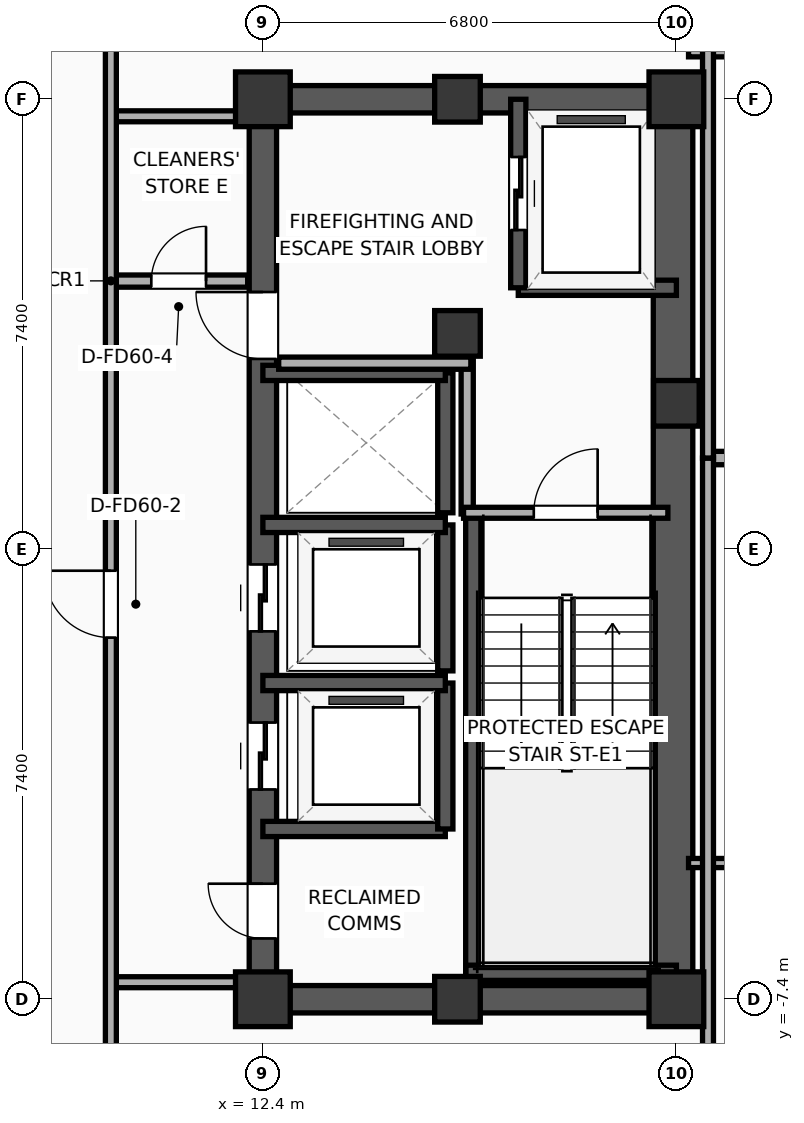
"""IFC4 building model, lengths in metres.
Left out: names, types, materials, properties, quantities, classifications, styles, units other than length and angle.
Written with IfcOpenShell. Run it as: python <this file> out.ifc"""

import sys

from ifc_helpers import new_model, si_unit, direction, frame, frame_2d, origin, origin_2d, place, context, subcontext, project, spatial, rectangle, extrude, element, fill, save


model = new_model("IFC4")
c1 = context("Model", 3, precision=1e-05, world=origin(), true_north=direction((0.0, 1.0)))
c2 = subcontext(c1, "Body", "Model", "MODEL_VIEW")
j1 = project(units=[si_unit("LENGTHUNIT", "METRE"), si_unit("PLANEANGLEUNIT", "RADIAN")], contexts=[c1])
p1 = place(None, origin())
s1 = spatial("IfcSite", under=j1, at=p1, CompositionType="ELEMENT")
p2 = place(p1, origin())
s2 = spatial("IfcBuilding", under=s1, at=p2, CompositionType="ELEMENT")
p3 = place(p2, frame((0.0, 0.0, 159.9)))
s3 = spatial("IfcBuildingStorey", under=s2, at=p3, CompositionType="ELEMENT", Elevation=159.9)
p4 = place(p3, frame((12.4, -7.4, 0.0), z_axis=(0.0, 0.0, 1.0), x_axis=(1.0, 0.0, 0.0)))
e1 = element("IfcColumn", 1, at=p4, inside=s3, PredefinedType="COLUMN", context=c2, shape_type="SweptSolid", body=[
    extrude(rectangle(XDim=0.9, YDim=0.9, at=origin_2d()), origin(), (0.0, 0.0, 1.0), 3.9),
])
p5 = place(p3, frame((15.6, 3.55, 0.0), z_axis=(0.0, 0.0, 1.0), x_axis=(1.0, 0.0, 0.0)))
e2 = element("IfcColumn", 2, at=p5, inside=s3, PredefinedType="COLUMN", context=c2, shape_type="SweptSolid", body=[
    extrude(rectangle(XDim=0.75, YDim=0.75, at=origin_2d()), origin(), (0.0, 0.0, 1.0), 3.9),
])
p6 = place(p3, frame((12.4, 7.4, 0.0), z_axis=(0.0, 0.0, 1.0), x_axis=(1.0, 0.0, 0.0)))
e3 = element("IfcColumn", 3, at=p6, inside=s3, PredefinedType="COLUMN", context=c2, shape_type="SweptSolid", body=[
    extrude(rectangle(XDim=0.9, YDim=0.9, at=origin_2d()), origin(), (0.0, 0.0, 1.0), 3.9),
])
for number, where, z_axis, x_axis in (
    (4, (15.6, -7.4, 0.0), (0.0, 0.0, 1.0), (1.0, 0.0, 0.0)),
    (5, (15.6, 7.4, 0.0), (0.0, 0.0, 1.0), (1.0, 0.0, 0.0)),
):
    element("IfcColumn", number, at=place(p3, frame(where, z_axis=z_axis, x_axis=x_axis)), inside=s3, PredefinedType="COLUMN", context=c2, shape_type="SweptSolid", body=[
        extrude(rectangle(XDim=0.75, YDim=0.75, at=origin_2d()), origin(), (0.0, 0.0, 1.0), 3.9),
    ])
p7 = place(p3, frame((19.2, -7.4, 0.0), z_axis=(0.0, 0.0, 1.0), x_axis=(1.0, 0.0, 0.0)))
e6 = element("IfcColumn", 6, at=p7, inside=s3, PredefinedType="COLUMN", context=c2, shape_type="SweptSolid", body=[
    extrude(rectangle(XDim=0.9, YDim=0.9, at=origin_2d()), origin(), (0.0, 0.0, 1.0), 3.9),
])
p8 = place(p3, frame((19.2, 2.4, 0.0), z_axis=(0.0, 0.0, 1.0), x_axis=(1.0, 0.0, 0.0)))
e7 = element("IfcColumn", 7, at=p8, inside=s3, PredefinedType="COLUMN", context=c2, shape_type="SweptSolid", body=[
    extrude(rectangle(XDim=0.75, YDim=0.75, at=origin_2d()), origin(), (0.0, 0.0, 1.0), 3.9),
])
p9 = place(p3, frame((19.2, 7.4, 0.0), z_axis=(0.0, 0.0, 1.0), x_axis=(1.0, 0.0, 0.0)))
e8 = element("IfcColumn", 8, at=p9, inside=s3, PredefinedType="COLUMN", context=c2, shape_type="SweptSolid", body=[
    extrude(rectangle(XDim=0.9, YDim=0.9, at=origin_2d()), origin(), (0.0, 0.0, 1.0), 3.9),
])
for number, where, z_axis, x_axis in (
    (9, (12.175, -7.4, 0.0), (0.0, 0.0, 1.0), (1.0, 0.0, 0.0)),
    (10, (12.175, 7.4, 0.0), (0.0, 0.0, 1.0), (1.0, 0.0, 0.0)),
):
    element("IfcWall", number, at=place(p3, frame(where, z_axis=z_axis, x_axis=x_axis)), inside=s3, PredefinedType="SHEAR", context=c2, shape_type="SweptSolid", body=[
        extrude(rectangle(XDim=7.25, YDim=0.45, at=frame_2d((3.625, 0.0))), origin(), (0.0, 0.0, 1.0), 3.65),
    ])
p10 = place(p3, frame((12.4, -7.4, 0.0), z_axis=(0.0, 0.0, 1.0), x_axis=(0.0, 1.0, 0.0)))
e11 = element("IfcWall", 11, at=p10, inside=s3, PredefinedType="SHEAR", context=c2, shape_type="SweptSolid", body=[
    extrude(rectangle(XDim=14.8, YDim=0.45, at=frame_2d((7.4, 0.0))), origin(), (0.0, 0.0, 1.0), 3.65),
])
p11 = place(p10, frame((3.45, 0.0, 0.0)))
e12 = element("IfcOpeningElement", 12, at=p11, cuts=e11, PredefinedType="OPENING", context=c2, shape_type="SweptSolid", body=[
    extrude(rectangle(XDim=1.1, YDim=2.05, at=frame_2d((0.55, 1.025))), frame((0.0, 0.235, 0.0), z_axis=(0.0, -1.0, 0.0), x_axis=(1.0, 0.0, 0.0)), (0.0, 0.0, 1.0), 0.47),
])
p12 = place(p10, frame((6.05, 0.0, 0.0)))
e13 = element("IfcOpeningElement", 13, at=p12, cuts=e11, PredefinedType="OPENING", context=c2, shape_type="SweptSolid", body=[
    extrude(rectangle(XDim=1.1, YDim=2.05, at=frame_2d((0.55, 1.025))), frame((0.0, 0.235, 0.0), z_axis=(0.0, -1.0, 0.0), x_axis=(1.0, 0.0, 0.0)), (0.0, 0.0, 1.0), 0.47),
])
p13 = place(p10, frame((10.53, 0.0, 0.0)))
e14 = element("IfcOpeningElement", 14, at=p13, cuts=e11, PredefinedType="OPENING", context=c2, shape_type="SweptSolid", body=[
    extrude(rectangle(XDim=1.1, YDim=2.05, at=frame_2d((0.55, 1.025))), frame((0.0, 0.235, 0.0), z_axis=(0.0, -1.0, 0.0), x_axis=(1.0, 0.0, 0.0)), (0.0, 0.0, 1.0), 0.47),
])
p14 = place(p10, frame((1.0, 0.0, 0.0)))
e15 = element("IfcOpeningElement", 15, at=p14, cuts=e11, PredefinedType="OPENING", context=c2, shape_type="SweptSolid", body=[
    extrude(rectangle(XDim=0.9, YDim=2.05, at=frame_2d((0.45, 1.025))), frame((0.0, 0.235, 0.0), z_axis=(0.0, -1.0, 0.0), x_axis=(1.0, 0.0, 0.0)), (0.0, 0.0, 1.0), 0.47),
])
p15 = place(p3, frame((19.145, -7.4, 0.0), z_axis=(0.0, 0.0, 1.0), x_axis=(0.0, 1.0, 0.0)))
e16 = element("IfcWall", 16, at=p15, inside=s3, PredefinedType="SHEAR", context=c2, shape_type="SweptSolid", body=[
    extrude(rectangle(XDim=14.8, YDim=0.65, at=frame_2d((7.4, 0.0))), origin(), (0.0, 0.0, 1.0), 3.65),
])
p16 = place(p3, frame((15.86, -7.085, 0.0), z_axis=(0.0, 0.0, 1.0), x_axis=(0.0, 1.0, 0.0)))
e17 = element("IfcWall", 17, at=p16, inside=s3, PredefinedType="SOLIDWALL", context=c2, shape_type="SweptSolid", body=[
    extrude(rectangle(XDim=7.685, YDim=0.25, at=frame_2d((3.843, 0.0))), origin(), (0.0, 0.0, 1.0), 3.65),
])
p17 = place(p3, frame((15.74, -6.965, 0.0), z_axis=(0.0, 0.0, 1.0), x_axis=(1.0, 0.0, 0.0)))
e18 = element("IfcWall", 18, at=p17, inside=s3, PredefinedType="SOLIDWALL", context=c2, shape_type="SweptSolid", body=[
    extrude(rectangle(XDim=3.46, YDim=0.25, at=frame_2d((1.73, 0.0))), origin(), (0.0, 0.0, 1.0), 3.65),
])
p18 = place(p3, frame((16.6, 4.3, 0.0), z_axis=(0.0, 0.0, 1.0), x_axis=(1.0, 0.0, 0.0)))
e19 = element("IfcWall", 19, at=p18, inside=s3, PredefinedType="SOLIDWALL", context=c2, shape_type="SweptSolid", body=[
    extrude(rectangle(XDim=2.6, YDim=0.25, at=frame_2d((1.3, 0.0))), origin(), (0.0, 0.0, 1.0), 3.65),
])
p19 = place(p3, frame((16.6, 7.4, 0.0), z_axis=(0.0, 0.0, 1.0), x_axis=(0.0, -1.0, 0.0)))
e20 = element("IfcWall", 20, at=p19, inside=s3, PredefinedType="SOLIDWALL", context=c2, shape_type="SweptSolid", body=[
    extrude(rectangle(XDim=3.1, YDim=0.25, at=frame_2d((1.55, 0.0))), origin(), (0.0, 0.0, 1.0), 3.65),
])
p20 = place(p19, frame((0.95, 0.0, 0.0)))
e21 = element("IfcOpeningElement", 21, at=p20, cuts=e20, PredefinedType="OPENING", context=c2, shape_type="SweptSolid", body=[
    extrude(rectangle(XDim=1.2, YDim=2.05, at=frame_2d((0.6, 1.025))), frame((0.0, 0.135, 0.0), z_axis=(0.0, -1.0, 0.0), x_axis=(1.0, 0.0, 0.0)), (0.0, 0.0, 1.0), 0.27),
])
p21 = place(p3, frame((12.4, -4.6, 0.0), z_axis=(0.0, 0.0, 1.0), x_axis=(1.0, 0.0, 0.0)))
e22 = element("IfcWall", 22, at=p21, inside=s3, PredefinedType="SOLIDWALL", context=c2, shape_type="SweptSolid", body=[
    extrude(rectangle(XDim=3.0, YDim=0.25, at=frame_2d((1.5, 0.0))), origin(), (0.0, 0.0, 1.0), 3.65),
])
p22 = place(p3, frame((15.4, -4.6, 0.0), z_axis=(0.0, 0.0, 1.0), x_axis=(0.0, 1.0, 0.0)))
e23 = element("IfcWall", 23, at=p22, inside=s3, PredefinedType="SOLIDWALL", context=c2, shape_type="SweptSolid", body=[
    extrude(rectangle(XDim=2.4, YDim=0.25, at=frame_2d((1.2, 0.0))), origin(), (0.0, 0.0, 1.0), 3.65),
])
p23 = place(p3, frame((15.4, -2.2, 0.0), z_axis=(0.0, 0.0, 1.0), x_axis=(-1.0, 0.0, 0.0)))
e24 = element("IfcWall", 24, at=p23, inside=s3, PredefinedType="SOLIDWALL", context=c2, shape_type="SweptSolid", body=[
    extrude(rectangle(XDim=3.0, YDim=0.25, at=frame_2d((1.5, 0.0))), origin(), (0.0, 0.0, 1.0), 3.65),
])
p24 = place(p3, frame((15.4, -2.0, 0.0), z_axis=(0.0, 0.0, 1.0), x_axis=(0.0, 1.0, 0.0)))
e25 = element("IfcWall", 25, at=p24, inside=s3, PredefinedType="SOLIDWALL", context=c2, shape_type="SweptSolid", body=[
    extrude(rectangle(XDim=2.4, YDim=0.25, at=frame_2d((1.2, 0.0))), origin(), (0.0, 0.0, 1.0), 3.65),
])
p25 = place(p3, frame((15.4, 0.4, 0.0), z_axis=(0.0, 0.0, 1.0), x_axis=(-1.0, 0.0, 0.0)))
e26 = element("IfcWall", 26, at=p25, inside=s3, PredefinedType="SOLIDWALL", context=c2, shape_type="SweptSolid", body=[
    extrude(rectangle(XDim=3.0, YDim=0.25, at=frame_2d((1.5, 0.0))), origin(), (0.0, 0.0, 1.0), 3.65),
])
p26 = place(p3, frame((15.4, 0.6, 0.0), z_axis=(0.0, 0.0, 1.0), x_axis=(0.0, 1.0, 0.0)))
e27 = element("IfcWall", 27, at=p26, inside=s3, PredefinedType="SOLIDWALL", context=c2, shape_type="SweptSolid", body=[
    extrude(rectangle(XDim=2.3, YDim=0.25, at=frame_2d((1.15, 0.0))), origin(), (0.0, 0.0, 1.0), 3.65),
])
p27 = place(p3, frame((15.4, 2.9, 0.0), z_axis=(0.0, 0.0, 1.0), x_axis=(-1.0, 0.0, 0.0)))
e28 = element("IfcWall", 28, at=p27, inside=s3, PredefinedType="SOLIDWALL", context=c2, shape_type="SweptSolid", body=[
    extrude(rectangle(XDim=3.0, YDim=0.25, at=frame_2d((1.5, 0.0))), origin(), (0.0, 0.0, 1.0), 3.65),
])
p28 = place(p3, frame((15.76, 0.58, 0.0), z_axis=(0.0, 0.0, 1.0), x_axis=(0.0, 1.0, 0.0)))
e29 = element("IfcWall", 29, at=p28, inside=s3, PredefinedType="PARTITIONING", context=c2, shape_type="SweptSolid", body=[
    extrude(rectangle(XDim=2.52, YDim=0.2, at=frame_2d((1.26, 0.0))), origin(), (0.0, 0.0, 1.0), 3.65),
])
p29 = place(p3, frame((12.66, 3.06, 0.0), z_axis=(0.0, 0.0, 1.0), x_axis=(1.0, 0.0, 0.0)))
e30 = element("IfcWall", 30, at=p29, inside=s3, PredefinedType="PARTITIONING", context=c2, shape_type="SweptSolid", body=[
    extrude(rectangle(XDim=3.16, YDim=0.2, at=frame_2d((1.58, 0.0))), origin(), (0.0, 0.0, 1.0), 3.65),
])
p30 = place(p3, frame((15.7, 0.6, 0.0), z_axis=(0.0, 0.0, 1.0), x_axis=(1.0, 0.0, 0.0)))
e31 = element("IfcWall", 31, at=p30, inside=s3, PredefinedType="PARTITIONING", context=c2, shape_type="SweptSolid", body=[
    extrude(rectangle(XDim=3.36, YDim=0.18, at=frame_2d((1.68, 0.0))), origin(), (0.0, 0.0, 1.0), 3.65),
])
p31 = place(p30, frame((1.155, 0.0, 0.0)))
e32 = element("IfcOpeningElement", 32, at=p31, cuts=e31, PredefinedType="OPENING", context=c2, shape_type="SweptSolid", body=[
    extrude(rectangle(XDim=1.05, YDim=2.05, at=frame_2d((0.525, 1.025))), frame((0.0, 0.1, 0.0), z_axis=(0.0, -1.0, 0.0), x_axis=(1.0, 0.0, 0.0)), (0.0, 0.0, 1.0), 0.2),
])
p32 = place(p3, frame((9.88, 4.41, 0.0), z_axis=(0.0, 0.0, 1.0), x_axis=(1.0, 0.0, 0.0)))
e33 = element("IfcWall", 33, at=p32, inside=s3, PredefinedType="PARTITIONING", context=c2, shape_type="SweptSolid", body=[
    extrude(rectangle(XDim=2.27, YDim=0.2, at=frame_2d((1.135, 0.0))), origin(), (0.0, 0.0, 1.0), 3.65),
])
p33 = place(p32, frame((0.685, 0.0, 0.0)))
e34 = element("IfcOpeningElement", 34, at=p33, cuts=e33, PredefinedType="OPENING", context=c2, shape_type="SweptSolid", body=[
    extrude(rectangle(XDim=0.9, YDim=2.05, at=frame_2d((0.45, 1.025))), frame((0.0, 0.11, 0.0), z_axis=(0.0, -1.0, 0.0), x_axis=(1.0, 0.0, 0.0)), (0.0, 0.0, 1.0), 0.22),
])
for number, where, z_axis, x_axis in (
    (35, (9.88, 7.12, 0.0), (0.0, 0.0, 1.0), (1.0, 0.0, 0.0)),
    (36, (9.88, -7.12, 0.0), (0.0, 0.0, 1.0), (1.0, 0.0, 0.0)),
):
    element("IfcWall", number, at=place(p3, frame(where, z_axis=z_axis, x_axis=x_axis)), inside=s3, PredefinedType="PARTITIONING", context=c2, shape_type="SweptSolid", body=[
        extrude(rectangle(XDim=2.27, YDim=0.18, at=frame_2d((1.135, 0.0))), origin(), (0.0, 0.0, 1.0), 3.65),
    ])
p34 = place(p3, frame((9.9, -9.03, 0.0), z_axis=(0.0, 0.0, 1.0), x_axis=(0.0, 1.0, 0.0)))
e37 = element("IfcWall", 37, at=p34, inside=s3, PredefinedType="PARTITIONING", context=c2, shape_type="SweptSolid", body=[
    extrude(rectangle(XDim=18.06, YDim=0.18, at=frame_2d((9.03, 0.0))), origin(), (0.0, 0.0, 1.0), 3.65),
])
p35 = place(p34, frame((7.577, 0.0, 0.0)))
e38 = element("IfcOpeningElement", 38, at=p35, cuts=e37, PredefinedType="OPENING", context=c2, shape_type="SweptSolid", body=[
    extrude(rectangle(XDim=1.1, YDim=2.05, at=frame_2d((0.55, 1.025))), frame((0.0, 0.1, 0.0), z_axis=(0.0, -1.0, 0.0), x_axis=(1.0, 0.0, 0.0)), (0.0, 0.0, 1.0), 0.2),
])
p36 = place(p3, frame((19.4, -5.16, 0.0), z_axis=(0.0, 0.0, 1.0), x_axis=(1.0, 0.0, 0.0)))
e39 = element("IfcWall", 39, at=p36, inside=s3, PredefinedType="PLUMBINGWALL", context=c2, shape_type="SweptSolid", body=[
    extrude(rectangle(XDim=3.05, YDim=0.15, at=frame_2d((1.525, 0.0))), origin(), (0.0, 0.0, 1.0), 3.65),
])
p37 = place(p36, frame((1.075, 0.0, 0.0)))
e40 = element("IfcOpeningElement", 40, at=p37, cuts=e39, PredefinedType="OPENING", context=c2, shape_type="SweptSolid", body=[
    extrude(rectangle(XDim=0.9, YDim=2.05, at=frame_2d((0.45, 1.025))), frame((0.0, 0.085, 0.0), z_axis=(0.0, -1.0, 0.0), x_axis=(1.0, 0.0, 0.0)), (0.0, 0.0, 1.0), 0.17),
])
p38 = place(p3, frame((19.4, 8.16, 0.0), z_axis=(0.0, 0.0, 1.0), x_axis=(1.0, 0.0, 0.0)))
e41 = element("IfcWall", 41, at=p38, inside=s3, PredefinedType="PARTITIONING", context=c2, shape_type="SweptSolid", body=[
    extrude(rectangle(XDim=2.6, YDim=0.125, at=frame_2d((1.3, 0.0))), origin(), (0.0, 0.0, 1.0), 3.04),
])
p39 = place(p38, frame((0.825, 0.0, 0.0)))
e42 = element("IfcOpeningElement", 42, at=p39, cuts=e41, PredefinedType="OPENING", context=c2, shape_type="SweptSolid", body=[
    extrude(rectangle(XDim=0.95, YDim=2.05, at=frame_2d((0.475, 1.025))), frame((0.0, 0.073, 0.0), z_axis=(0.0, -1.0, 0.0), x_axis=(1.0, 0.0, 0.0)), (0.0, 0.0, 1.0), 0.145),
])
p40 = place(p3, frame((19.72, 1.5, 0.0), z_axis=(0.0, 0.0, 1.0), x_axis=(1.0, 0.0, 0.0)))
e43 = element("IfcWall", 43, at=p40, inside=s3, PredefinedType="PARTITIONING", context=c2, shape_type="SweptSolid", body=[
    extrude(rectangle(XDim=6.653, YDim=0.22, at=frame_2d((3.326, 0.0))), origin(), (0.0, 0.0, 1.0), 3.65),
])
p41 = place(p3, frame((19.72, -18.532, 0.0), z_axis=(0.0, 0.0, 1.0), x_axis=(0.0, 1.0, 0.0)))
e44 = element("IfcWall", 44, at=p41, inside=s3, PredefinedType="PARTITIONING", context=c2, shape_type="SweptSolid", body=[
    extrude(rectangle(XDim=20.032, YDim=0.18, at=frame_2d((10.016, 0.0))), origin(), (0.0, 0.0, 1.0), 3.65),
])
p42 = place(p41, frame((8.402, 0.0, 0.0)))
e45 = element("IfcOpeningElement", 45, at=p42, cuts=e44, PredefinedType="OPENING", context=c2, shape_type="SweptSolid", body=[
    extrude(rectangle(XDim=0.9, YDim=2.05, at=frame_2d((0.45, 1.025))), frame((0.0, 0.1, 0.0), z_axis=(0.0, -1.0, 0.0), x_axis=(1.0, 0.0, 0.0)), (0.0, 0.0, 1.0), 0.2),
])
p43 = place(p3, frame((19.72, 1.5, 0.0), z_axis=(0.0, 0.0, 1.0), x_axis=(0.0, 1.0, 0.0)))
e46 = element("IfcWall", 46, at=p43, inside=s3, PredefinedType="PARTITIONING", context=c2, shape_type="SweptSolid", body=[
    extrude(rectangle(XDim=20.65, YDim=0.18, at=frame_2d((10.325, 0.0))), origin(), (0.0, 0.0, 1.0), 3.04),
])
p44 = place(p43, frame((7.729, 0.0, 0.0)))
e47 = element("IfcOpeningElement", 47, at=p44, cuts=e46, PredefinedType="OPENING", context=c2, shape_type="SweptSolid", body=[
    extrude(rectangle(XDim=0.9, YDim=2.05, at=frame_2d((0.45, 1.025))), frame((0.0, 0.1, 0.0), z_axis=(0.0, -1.0, 0.0), x_axis=(1.0, 0.0, 0.0)), (0.0, 0.0, 1.0), 0.2),
])
p45 = place(p20, origin())
e48 = element("IfcDoor", 48, at=p45, inside=s3, OperationType="SLIDING_TO_LEFT", PredefinedType="DOOR", context=c2, shape_type="SweptSolid", body=[
    extrude(rectangle(XDim=1.2, YDim=2.05, at=frame_2d((0.6, 1.025))), frame((0.0, 0.025, 0.0), z_axis=(0.0, -1.0, 0.0), x_axis=(1.0, 0.0, 0.0)), (0.0, 0.0, 1.0), 0.05),
])
fill(e21, e48)
p46 = place(p11, origin())
e49 = element("IfcDoor", 49, at=p46, inside=s3, OperationType="SLIDING_TO_LEFT", PredefinedType="DOOR", context=c2, shape_type="SweptSolid", body=[
    extrude(rectangle(XDim=1.1, YDim=2.05, at=frame_2d((0.55, 1.025))), frame((0.0, 0.025, 0.0), z_axis=(0.0, -1.0, 0.0), x_axis=(1.0, 0.0, 0.0)), (0.0, 0.0, 1.0), 0.05),
])
fill(e12, e49)
p47 = place(p12, origin())
e50 = element("IfcDoor", 50, at=p47, inside=s3, OperationType="SLIDING_TO_LEFT", PredefinedType="DOOR", context=c2, shape_type="SweptSolid", body=[
    extrude(rectangle(XDim=1.1, YDim=2.05, at=frame_2d((0.55, 1.025))), frame((0.0, 0.025, 0.0), z_axis=(0.0, -1.0, 0.0), x_axis=(1.0, 0.0, 0.0)), (0.0, 0.0, 1.0), 0.05),
])
fill(e13, e50)
p48 = place(p31, origin())
e51 = element("IfcDoor", 51, at=p48, inside=s3, OperationType="SINGLE_SWING_RIGHT", PredefinedType="DOOR", context=c2, shape_type="SweptSolid", body=[
    extrude(rectangle(XDim=1.05, YDim=2.05, at=frame_2d((0.525, 1.025))), frame((0.0, 0.025, 0.0), z_axis=(0.0, -1.0, 0.0), x_axis=(1.0, 0.0, 0.0)), (0.0, 0.0, 1.0), 0.05),
])
fill(e32, e51)
p49 = place(p33, origin())
e52 = element("IfcDoor", 52, at=p49, inside=s3, OperationType="SINGLE_SWING_RIGHT", PredefinedType="DOOR", context=c2, shape_type="SweptSolid", body=[
    extrude(rectangle(XDim=0.9, YDim=2.05, at=frame_2d((0.45, 1.025))), frame((0.0, 0.025, 0.0), z_axis=(0.0, -1.0, 0.0), x_axis=(1.0, 0.0, 0.0)), (0.0, 0.0, 1.0), 0.05),
])
fill(e34, e52)
p50 = place(p35, origin())
e53 = element("IfcDoor", 53, at=p50, inside=s3, OperationType="SINGLE_SWING_RIGHT", PredefinedType="DOOR", context=c2, shape_type="SweptSolid", body=[
    extrude(rectangle(XDim=1.1, YDim=2.05, at=frame_2d((0.55, 1.025))), frame((0.0, 0.025, 0.0), z_axis=(0.0, -1.0, 0.0), x_axis=(1.0, 0.0, 0.0)), (0.0, 0.0, 1.0), 0.05),
])
fill(e38, e53)
p51 = place(p13, origin())
e54 = element("IfcDoor", 54, at=p51, inside=s3, OperationType="SINGLE_SWING_RIGHT", PredefinedType="DOOR", context=c2, shape_type="SweptSolid", body=[
    extrude(rectangle(XDim=1.1, YDim=2.05, at=frame_2d((0.55, 1.025))), frame((0.0, 0.025, 0.0), z_axis=(0.0, -1.0, 0.0), x_axis=(1.0, 0.0, 0.0)), (0.0, 0.0, 1.0), 0.05),
])
fill(e14, e54)
p52 = place(p14, origin())
e55 = element("IfcDoor", 55, at=p52, inside=s3, OperationType="SINGLE_SWING_RIGHT", PredefinedType="DOOR", context=c2, shape_type="SweptSolid", body=[
    extrude(rectangle(XDim=0.9, YDim=2.05, at=frame_2d((0.45, 1.025))), frame((0.0, 0.025, 0.0), z_axis=(0.0, -1.0, 0.0), x_axis=(1.0, 0.0, 0.0)), (0.0, 0.0, 1.0), 0.05),
])
fill(e15, e55)
save(model, sys.argv[1])
